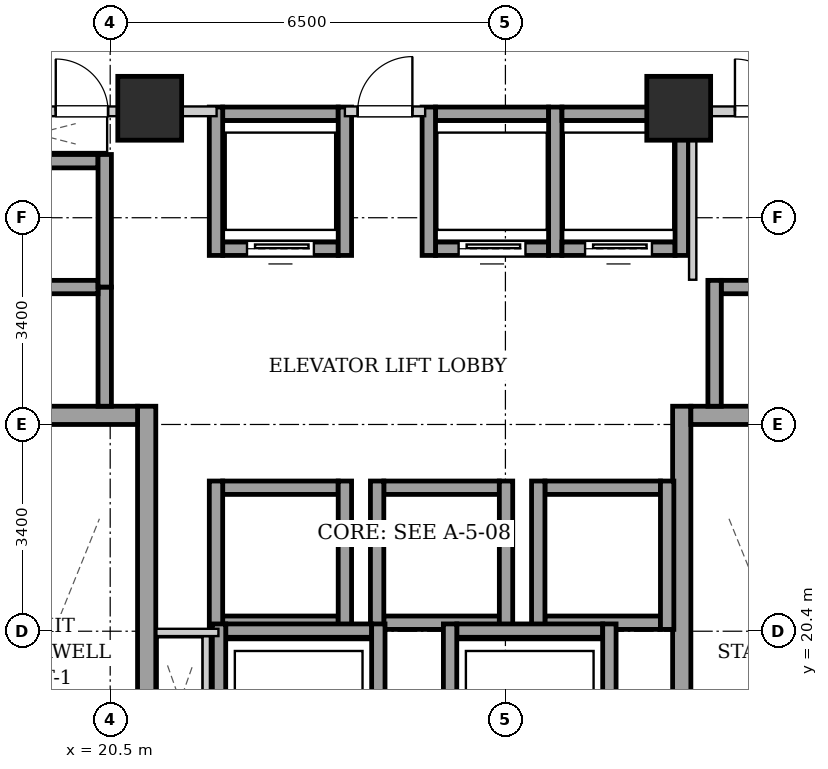
"""IFC4 building model, lengths in metres.
Left out: names, types, materials, properties, quantities, classifications, styles, units other than length and angle.
Written with IfcOpenShell. Run it as: python <this file> out.ifc"""

import sys

from ifc_helpers import new_model, si_unit, direction, frame, frame_2d, origin, origin_2d, place, context, subcontext, project, spatial, rectangle, extrude, element, fill, save


model = new_model("IFC4")
c1 = context("Model", 3, precision=1e-05, world=origin(), true_north=direction((0.0, 1.0)))
c2 = subcontext(c1, "Body", "Model", "MODEL_VIEW")
j1 = project(units=[si_unit("LENGTHUNIT", "METRE"), si_unit("PLANEANGLEUNIT", "RADIAN")], contexts=[c1])
p1 = place(None, origin())
s1 = spatial("IfcSite", under=j1, at=p1, CompositionType="ELEMENT")
p2 = place(p1, origin())
s2 = spatial("IfcBuilding", under=s1, at=p2, CompositionType="ELEMENT")
p3 = place(p2, frame((0.0, 0.0, 75.1)))
s3 = spatial("IfcBuildingStorey", under=s2, at=p3, CompositionType="ELEMENT", Elevation=75.1)
for number, where, z_axis, x_axis in (
    (1, (21.15, 29.0, 0.0), (0.0, 0.0, 1.0), (1.0, 0.0, 0.0)),
    (2, (29.85, 29.0, 0.0), (0.0, 0.0, 1.0), (1.0, 0.0, 0.0)),
):
    element("IfcColumn", number, at=place(p3, frame(where, z_axis=z_axis, x_axis=x_axis)), inside=s3, PredefinedType="COLUMN", context=c2, shape_type="SweptSolid", body=[
        extrude(rectangle(XDim=1.05, YDim=1.05, at=origin_2d()), origin(), (0.0, 0.0, 1.0), 3.2),
    ])
p4 = place(p3, frame((21.1, 15.1, 0.0), z_axis=(0.0, 0.0, 1.0), x_axis=(0.0, 1.0, 0.0)))
e3 = element("IfcWall", 3, at=p4, inside=s3, PredefinedType="SHEAR", context=c2, shape_type="SweptSolid", body=[
    extrude(rectangle(XDim=9.0, YDim=0.3, at=frame_2d((4.5, 0.0))), origin(), (0.0, 0.0, 1.0), 2.94),
])
p5 = place(p3, frame((18.1, 23.95, 0.0), z_axis=(0.0, 0.0, 1.0), x_axis=(1.0, 0.0, 0.0)))
e4 = element("IfcWall", 4, at=p5, inside=s3, PredefinedType="SHEAR", context=c2, shape_type="SweptSolid", body=[
    extrude(rectangle(XDim=2.85, YDim=0.3, at=frame_2d((1.425, 0.0))), origin(), (0.0, 0.0, 1.0), 2.94),
])
p6 = place(p3, frame((29.9, 15.1, 0.0), z_axis=(0.0, 0.0, 1.0), x_axis=(0.0, 1.0, 0.0)))
e5 = element("IfcWall", 5, at=p6, inside=s3, PredefinedType="SHEAR", context=c2, shape_type="SweptSolid", body=[
    extrude(rectangle(XDim=9.0, YDim=0.3, at=frame_2d((4.5, 0.0))), origin(), (0.0, 0.0, 1.0), 2.94),
])
p7 = place(p3, frame((30.05, 23.95, 0.0), z_axis=(0.0, 0.0, 1.0), x_axis=(1.0, 0.0, 0.0)))
e6 = element("IfcWall", 6, at=p7, inside=s3, PredefinedType="SHEAR", context=c2, shape_type="SweptSolid", body=[
    extrude(rectangle(XDim=2.85, YDim=0.3, at=frame_2d((1.425, 0.0))), origin(), (0.0, 0.0, 1.0), 2.94),
])
p8 = place(p3, frame((22.35, 26.69, 0.0), z_axis=(0.0, 0.0, 1.0), x_axis=(1.0, 0.0, 0.0)))
e7 = element("IfcWall", 7, at=p8, inside=s3, PredefinedType="SHEAR", context=c2, shape_type="SweptSolid", body=[
    extrude(rectangle(XDim=1.9, YDim=0.22, at=frame_2d((0.95, 0.0))), origin(), (0.0, 0.0, 1.0), 2.94),
])
p9 = place(p8, frame((0.4, 0.0, 0.0)))
e8 = element("IfcOpeningElement", 8, at=p9, cuts=e7, PredefinedType="OPENING", context=c2, shape_type="SweptSolid", body=[
    extrude(rectangle(XDim=1.1, YDim=2.15, at=frame_2d((0.55, 1.075))), frame((0.0, 0.12, 0.0), z_axis=(0.0, -1.0, 0.0), x_axis=(1.0, 0.0, 0.0)), (0.0, 0.0, 1.0), 0.24),
])
p10 = place(p3, frame((22.35, 28.91, 0.0), z_axis=(0.0, 0.0, 1.0), x_axis=(1.0, 0.0, 0.0)))
e9 = element("IfcWall", 9, at=p10, inside=s3, PredefinedType="SHEAR", context=c2, shape_type="SweptSolid", body=[
    extrude(rectangle(XDim=1.9, YDim=0.22, at=frame_2d((0.95, 0.0))), origin(), (0.0, 0.0, 1.0), 2.94),
])
for number, where, z_axis, x_axis in (
    (10, (22.24, 26.58, 0.0), (0.0, 0.0, 1.0), (0.0, 1.0, 0.0)),
    (11, (24.36, 26.58, 0.0), (0.0, 0.0, 1.0), (0.0, 1.0, 0.0)),
):
    element("IfcWall", number, at=place(p3, frame(where, z_axis=z_axis, x_axis=x_axis)), inside=s3, PredefinedType="SHEAR", context=c2, shape_type="SweptSolid", body=[
        extrude(rectangle(XDim=2.44, YDim=0.22, at=frame_2d((1.22, 0.0))), origin(), (0.0, 0.0, 1.0), 2.94),
    ])
p11 = place(p3, frame((25.85, 26.69, 0.0), z_axis=(0.0, 0.0, 1.0), x_axis=(1.0, 0.0, 0.0)))
e12 = element("IfcWall", 12, at=p11, inside=s3, PredefinedType="SHEAR", context=c2, shape_type="SweptSolid", body=[
    extrude(rectangle(XDim=1.86, YDim=0.22, at=frame_2d((0.93, 0.0))), origin(), (0.0, 0.0, 1.0), 2.94),
])
p12 = place(p11, frame((0.38, 0.0, 0.0)))
e13 = element("IfcOpeningElement", 13, at=p12, cuts=e12, PredefinedType="OPENING", context=c2, shape_type="SweptSolid", body=[
    extrude(rectangle(XDim=1.1, YDim=2.15, at=frame_2d((0.55, 1.075))), frame((0.0, 0.12, 0.0), z_axis=(0.0, -1.0, 0.0), x_axis=(1.0, 0.0, 0.0)), (0.0, 0.0, 1.0), 0.24),
])
p13 = place(p3, frame((25.85, 28.91, 0.0), z_axis=(0.0, 0.0, 1.0), x_axis=(1.0, 0.0, 0.0)))
e14 = element("IfcWall", 14, at=p13, inside=s3, PredefinedType="SHEAR", context=c2, shape_type="SweptSolid", body=[
    extrude(rectangle(XDim=1.86, YDim=0.22, at=frame_2d((0.93, 0.0))), origin(), (0.0, 0.0, 1.0), 2.94),
])
for number, where, z_axis, x_axis in (
    (15, (25.74, 26.58, 0.0), (0.0, 0.0, 1.0), (0.0, 1.0, 0.0)),
    (16, (27.82, 26.58, 0.0), (0.0, 0.0, 1.0), (0.0, 1.0, 0.0)),
):
    element("IfcWall", number, at=place(p3, frame(where, z_axis=z_axis, x_axis=x_axis)), inside=s3, PredefinedType="SHEAR", context=c2, shape_type="SweptSolid", body=[
        extrude(rectangle(XDim=2.44, YDim=0.22, at=frame_2d((1.22, 0.0))), origin(), (0.0, 0.0, 1.0), 2.94),
    ])
p14 = place(p3, frame((27.93, 26.69, 0.0), z_axis=(0.0, 0.0, 1.0), x_axis=(1.0, 0.0, 0.0)))
e17 = element("IfcWall", 17, at=p14, inside=s3, PredefinedType="SHEAR", context=c2, shape_type="SweptSolid", body=[
    extrude(rectangle(XDim=1.86, YDim=0.22, at=frame_2d((0.93, 0.0))), origin(), (0.0, 0.0, 1.0), 2.94),
])
p15 = place(p14, frame((0.38, 0.0, 0.0)))
e18 = element("IfcOpeningElement", 18, at=p15, cuts=e17, PredefinedType="OPENING", context=c2, shape_type="SweptSolid", body=[
    extrude(rectangle(XDim=1.1, YDim=2.15, at=frame_2d((0.55, 1.075))), frame((0.0, 0.12, 0.0), z_axis=(0.0, -1.0, 0.0), x_axis=(1.0, 0.0, 0.0)), (0.0, 0.0, 1.0), 0.24),
])
p16 = place(p3, frame((27.93, 28.91, 0.0), z_axis=(0.0, 0.0, 1.0), x_axis=(1.0, 0.0, 0.0)))
e19 = element("IfcWall", 19, at=p16, inside=s3, PredefinedType="SHEAR", context=c2, shape_type="SweptSolid", body=[
    extrude(rectangle(XDim=1.86, YDim=0.22, at=frame_2d((0.93, 0.0))), origin(), (0.0, 0.0, 1.0), 2.94),
])
p17 = place(p3, frame((29.9, 26.58, 0.0), z_axis=(0.0, 0.0, 1.0), x_axis=(0.0, 1.0, 0.0)))
e20 = element("IfcWall", 20, at=p17, inside=s3, PredefinedType="SHEAR", context=c2, shape_type="SweptSolid", body=[
    extrude(rectangle(XDim=2.44, YDim=0.22, at=frame_2d((1.22, 0.0))), origin(), (0.0, 0.0, 1.0), 2.94),
])
for number, where, z_axis, x_axis in (
    (21, (22.35, 20.54, 0.0), (0.0, 0.0, 1.0), (1.0, 0.0, 0.0)),
    (22, (22.35, 22.76, 0.0), (0.0, 0.0, 1.0), (1.0, 0.0, 0.0)),
):
    element("IfcWall", number, at=place(p3, frame(where, z_axis=z_axis, x_axis=x_axis)), inside=s3, PredefinedType="SHEAR", context=c2, shape_type="SweptSolid", body=[
        extrude(rectangle(XDim=1.9, YDim=0.22, at=frame_2d((0.95, 0.0))), origin(), (0.0, 0.0, 1.0), 2.94),
    ])
for number, where, z_axis, x_axis in (
    (23, (22.24, 20.43, 0.0), (0.0, 0.0, 1.0), (0.0, 1.0, 0.0)),
    (24, (24.36, 20.43, 0.0), (0.0, 0.0, 1.0), (0.0, 1.0, 0.0)),
):
    element("IfcWall", number, at=place(p3, frame(where, z_axis=z_axis, x_axis=x_axis)), inside=s3, PredefinedType="SHEAR", context=c2, shape_type="SweptSolid", body=[
        extrude(rectangle(XDim=2.44, YDim=0.22, at=frame_2d((1.22, 0.0))), origin(), (0.0, 0.0, 1.0), 2.94),
    ])
for number, where, z_axis, x_axis in (
    (25, (25.0, 20.54, 0.0), (0.0, 0.0, 1.0), (1.0, 0.0, 0.0)),
    (26, (25.0, 22.76, 0.0), (0.0, 0.0, 1.0), (1.0, 0.0, 0.0)),
):
    element("IfcWall", number, at=place(p3, frame(where, z_axis=z_axis, x_axis=x_axis)), inside=s3, PredefinedType="SHEAR", context=c2, shape_type="SweptSolid", body=[
        extrude(rectangle(XDim=1.9, YDim=0.22, at=frame_2d((0.95, 0.0))), origin(), (0.0, 0.0, 1.0), 2.94),
    ])
for number, where, z_axis, x_axis in (
    (27, (24.89, 20.43, 0.0), (0.0, 0.0, 1.0), (0.0, 1.0, 0.0)),
    (28, (27.01, 20.43, 0.0), (0.0, 0.0, 1.0), (0.0, 1.0, 0.0)),
):
    element("IfcWall", number, at=place(p3, frame(where, z_axis=z_axis, x_axis=x_axis)), inside=s3, PredefinedType="SHEAR", context=c2, shape_type="SweptSolid", body=[
        extrude(rectangle(XDim=2.44, YDim=0.22, at=frame_2d((1.22, 0.0))), origin(), (0.0, 0.0, 1.0), 2.94),
    ])
for number, where, z_axis, x_axis in (
    (29, (27.65, 20.54, 0.0), (0.0, 0.0, 1.0), (1.0, 0.0, 0.0)),
    (30, (27.65, 22.76, 0.0), (0.0, 0.0, 1.0), (1.0, 0.0, 0.0)),
):
    element("IfcWall", number, at=place(p3, frame(where, z_axis=z_axis, x_axis=x_axis)), inside=s3, PredefinedType="SHEAR", context=c2, shape_type="SweptSolid", body=[
        extrude(rectangle(XDim=1.9, YDim=0.22, at=frame_2d((0.95, 0.0))), origin(), (0.0, 0.0, 1.0), 2.94),
    ])
for number, where, z_axis, x_axis in (
    (31, (27.54, 20.43, 0.0), (0.0, 0.0, 1.0), (0.0, 1.0, 0.0)),
    (32, (29.66, 20.43, 0.0), (0.0, 0.0, 1.0), (0.0, 1.0, 0.0)),
):
    element("IfcWall", number, at=place(p3, frame(where, z_axis=z_axis, x_axis=x_axis)), inside=s3, PredefinedType="SHEAR", context=c2, shape_type="SweptSolid", body=[
        extrude(rectangle(XDim=2.44, YDim=0.22, at=frame_2d((1.22, 0.0))), origin(), (0.0, 0.0, 1.0), 2.94),
    ])
p18 = place(p3, frame((20.41, 24.1, 0.0), z_axis=(0.0, 0.0, 1.0), x_axis=(0.0, 1.0, 0.0)))
e33 = element("IfcWall", 33, at=p18, inside=s3, PredefinedType="SHEAR", context=c2, shape_type="SweptSolid", body=[
    extrude(rectangle(XDim=1.96, YDim=0.22, at=frame_2d((0.98, 0.0))), origin(), (0.0, 0.0, 1.0), 2.94),
])
for number, where, z_axis, x_axis in (
    (34, (18.4, 26.06, 0.0), (0.0, 0.0, 1.0), (1.0, 0.0, 0.0)),
    (35, (18.4, 28.13, 0.0), (0.0, 0.0, 1.0), (1.0, 0.0, 0.0)),
):
    element("IfcWall", number, at=place(p3, frame(where, z_axis=z_axis, x_axis=x_axis)), inside=s3, PredefinedType="SHEAR", context=c2, shape_type="SweptSolid", body=[
        extrude(rectangle(XDim=1.9, YDim=0.22, at=frame_2d((0.95, 0.0))), origin(), (0.0, 0.0, 1.0), 2.94),
    ])
p19 = place(p3, frame((20.41, 26.06, 0.0), z_axis=(0.0, 0.0, 1.0), x_axis=(0.0, 1.0, 0.0)))
e36 = element("IfcWall", 36, at=p19, inside=s3, PredefinedType="SHEAR", context=c2, shape_type="SweptSolid", body=[
    extrude(rectangle(XDim=2.18, YDim=0.22, at=frame_2d((1.09, 0.0))), origin(), (0.0, 0.0, 1.0), 2.94),
])
p20 = place(p3, frame((30.55, 26.06, 0.0), z_axis=(0.0, 0.0, 1.0), x_axis=(1.0, 0.0, 0.0)))
e37 = element("IfcWall", 37, at=p20, inside=s3, PredefinedType="SHEAR", context=c2, shape_type="SweptSolid", body=[
    extrude(rectangle(XDim=1.9, YDim=0.22, at=frame_2d((0.95, 0.0))), origin(), (0.0, 0.0, 1.0), 2.94),
])
p21 = place(p3, frame((30.44, 24.1, 0.0), z_axis=(0.0, 0.0, 1.0), x_axis=(0.0, 1.0, 0.0)))
e38 = element("IfcWall", 38, at=p21, inside=s3, PredefinedType="SHEAR", context=c2, shape_type="SweptSolid", body=[
    extrude(rectangle(XDim=2.07, YDim=0.22, at=frame_2d((1.035, 0.0))), origin(), (0.0, 0.0, 1.0), 2.94),
])
p22 = place(p3, frame((22.4, 20.41, 0.0), z_axis=(0.0, 0.0, 1.0), x_axis=(1.0, 0.0, 0.0)))
e39 = element("IfcWall", 39, at=p22, inside=s3, PredefinedType="SHEAR", context=c2, shape_type="SweptSolid", body=[
    extrude(rectangle(XDim=2.4, YDim=0.22, at=frame_2d((1.2, 0.0))), origin(), (0.0, 0.0, 1.0), 2.94),
])
for number, where, z_axis, x_axis in (
    (40, (22.29, 17.98, 0.0), (0.0, 0.0, 1.0), (0.0, 1.0, 0.0)),
    (41, (24.91, 17.98, 0.0), (0.0, 0.0, 1.0), (0.0, 1.0, 0.0)),
):
    element("IfcWall", number, at=place(p3, frame(where, z_axis=z_axis, x_axis=x_axis)), inside=s3, PredefinedType="SHEAR", context=c2, shape_type="SweptSolid", body=[
        extrude(rectangle(XDim=2.54, YDim=0.22, at=frame_2d((1.27, 0.0))), origin(), (0.0, 0.0, 1.0), 2.94),
    ])
p23 = place(p3, frame((26.2, 20.41, 0.0), z_axis=(0.0, 0.0, 1.0), x_axis=(1.0, 0.0, 0.0)))
e42 = element("IfcWall", 42, at=p23, inside=s3, PredefinedType="SHEAR", context=c2, shape_type="SweptSolid", body=[
    extrude(rectangle(XDim=2.4, YDim=0.22, at=frame_2d((1.2, 0.0))), origin(), (0.0, 0.0, 1.0), 2.94),
])
for number, where, z_axis, x_axis in (
    (43, (26.09, 17.98, 0.0), (0.0, 0.0, 1.0), (0.0, 1.0, 0.0)),
    (44, (28.71, 17.98, 0.0), (0.0, 0.0, 1.0), (0.0, 1.0, 0.0)),
):
    element("IfcWall", number, at=place(p3, frame(where, z_axis=z_axis, x_axis=x_axis)), inside=s3, PredefinedType="SHEAR", context=c2, shape_type="SweptSolid", body=[
        extrude(rectangle(XDim=2.54, YDim=0.22, at=frame_2d((1.27, 0.0))), origin(), (0.0, 0.0, 1.0), 2.94),
    ])
p24 = place(p3, frame((24.36, 28.95, 0.0), z_axis=(0.0, 0.0, 1.0), x_axis=(1.0, 0.0, 0.0)))
e45 = element("IfcWall", 45, at=p24, inside=s3, PredefinedType="PARTITIONING", context=c2, shape_type="SweptSolid", body=[
    extrude(rectangle(XDim=1.32, YDim=0.16, at=frame_2d((0.66, 0.0))), origin(), (0.0, 0.0, 1.0), 2.309),
])
p25 = place(p24, frame((0.21, 0.0, 0.0)))
e46 = element("IfcOpeningElement", 46, at=p25, cuts=e45, PredefinedType="OPENING", context=c2, shape_type="SweptSolid", body=[
    extrude(rectangle(XDim=0.9, YDim=2.05, at=frame_2d((0.45, 1.025))), frame((0.0, 0.09, 0.0), z_axis=(0.0, -1.0, 0.0), x_axis=(1.0, 0.0, 0.0)), (0.0, 0.0, 1.0), 0.18),
])
p26 = place(p3, frame((17.96, 28.95, 0.0), z_axis=(0.0, 0.0, 1.0), x_axis=(1.0, 0.0, 0.0)))
e47 = element("IfcWall", 47, at=p26, inside=s3, PredefinedType="PARTITIONING", context=c2, shape_type="SweptSolid", body=[
    extrude(rectangle(XDim=4.29, YDim=0.16, at=frame_2d((2.145, 0.0))), origin(), (0.0, 0.0, 1.0), 2.309),
])
p27 = place(p26, frame((1.645, 0.0, 0.0)))
e48 = element("IfcOpeningElement", 48, at=p27, cuts=e47, PredefinedType="OPENING", context=c2, shape_type="SweptSolid", body=[
    extrude(rectangle(XDim=0.86, YDim=2.05, at=frame_2d((0.43, 1.025))), frame((0.0, 0.09, 0.0), z_axis=(0.0, -1.0, 0.0), x_axis=(1.0, 0.0, 0.0)), (0.0, 0.0, 1.0), 0.18),
])
p28 = place(p3, frame((22.08, 18.2, 0.0), z_axis=(0.0, 0.0, 1.0), x_axis=(0.0, 1.0, 0.0)))
e49 = element("IfcWall", 49, at=p28, inside=s3, PredefinedType="PARTITIONING", context=c2, shape_type="SweptSolid", body=[
    extrude(rectangle(XDim=2.12, YDim=0.12, at=frame_2d((1.06, 0.0))), origin(), (0.0, 0.0, 1.0), 2.94),
])
p29 = place(p3, frame((22.28, 20.38, 0.0), z_axis=(0.0, 0.0, 1.0), x_axis=(-1.0, 0.0, 0.0)))
e50 = element("IfcWall", 50, at=p29, inside=s3, PredefinedType="PARTITIONING", context=c2, shape_type="SweptSolid", body=[
    extrude(rectangle(XDim=1.02, YDim=0.12, at=frame_2d((0.51, 0.0))), origin(), (0.0, 0.0, 1.0), 2.94),
])
p30 = place(p3, frame((30.08, 26.18, 0.0), z_axis=(0.0, 0.0, 1.0), x_axis=(0.0, 1.0, 0.0)))
e51 = element("IfcWall", 51, at=p30, inside=s3, PredefinedType="PARTITIONING", context=c2, shape_type="SweptSolid", body=[
    extrude(rectangle(XDim=2.68, YDim=0.12, at=frame_2d((1.34, 0.0))), origin(), (0.0, 0.0, 1.0), 2.94),
])
p31 = place(p3, frame((30.08, 28.95, 0.0), z_axis=(0.0, 0.0, 1.0), x_axis=(1.0, 0.0, 0.0)))
e52 = element("IfcWall", 52, at=p31, inside=s3, PredefinedType="PARTITIONING", context=c2, shape_type="SweptSolid", body=[
    extrude(rectangle(XDim=2.96, YDim=0.16, at=frame_2d((1.48, 0.0))), origin(), (0.0, 0.0, 1.0), 2.94),
])
p32 = place(p31, frame((0.695, 0.0, 0.0)))
e53 = element("IfcOpeningElement", 53, at=p32, cuts=e52, PredefinedType="OPENING", context=c2, shape_type="SweptSolid", body=[
    extrude(rectangle(XDim=0.86, YDim=2.05, at=frame_2d((0.43, 1.025))), frame((0.0, 0.09, 0.0), z_axis=(0.0, -1.0, 0.0), x_axis=(1.0, 0.0, 0.0)), (0.0, 0.0, 1.0), 0.18),
])
p33 = place(p9, origin())
e54 = element("IfcDoor", 54, at=p33, inside=s3, OperationType="SLIDING_TO_LEFT", PredefinedType="DOOR", context=c2, shape_type="SweptSolid", body=[
    extrude(rectangle(XDim=1.1, YDim=2.15, at=frame_2d((0.55, 1.075))), frame((0.0, 0.025, 0.0), z_axis=(0.0, -1.0, 0.0), x_axis=(1.0, 0.0, 0.0)), (0.0, 0.0, 1.0), 0.05),
])
fill(e8, e54)
p34 = place(p12, origin())
e55 = element("IfcDoor", 55, at=p34, inside=s3, OperationType="SLIDING_TO_LEFT", PredefinedType="DOOR", context=c2, shape_type="SweptSolid", body=[
    extrude(rectangle(XDim=1.1, YDim=2.15, at=frame_2d((0.55, 1.075))), frame((0.0, 0.025, 0.0), z_axis=(0.0, -1.0, 0.0), x_axis=(1.0, 0.0, 0.0)), (0.0, 0.0, 1.0), 0.05),
])
fill(e13, e55)
p35 = place(p15, origin())
e56 = element("IfcDoor", 56, at=p35, inside=s3, OperationType="SLIDING_TO_LEFT", PredefinedType="DOOR", context=c2, shape_type="SweptSolid", body=[
    extrude(rectangle(XDim=1.1, YDim=2.15, at=frame_2d((0.55, 1.075))), frame((0.0, 0.025, 0.0), z_axis=(0.0, -1.0, 0.0), x_axis=(1.0, 0.0, 0.0)), (0.0, 0.0, 1.0), 0.05),
])
fill(e18, e56)
p36 = place(p25, origin())
e57 = element("IfcDoor", 57, at=p36, inside=s3, OperationType="SINGLE_SWING_RIGHT", PredefinedType="DOOR", context=c2, shape_type="SweptSolid", body=[
    extrude(rectangle(XDim=0.9, YDim=2.05, at=frame_2d((0.45, 1.025))), frame((0.0, 0.025, 0.0), z_axis=(0.0, -1.0, 0.0), x_axis=(1.0, 0.0, 0.0)), (0.0, 0.0, 1.0), 0.05),
])
fill(e46, e57)
p37 = place(p27, origin())
e58 = element("IfcDoor", 58, at=p37, inside=s3, OperationType="SINGLE_SWING_LEFT", PredefinedType="DOOR", context=c2, shape_type="SweptSolid", body=[
    extrude(rectangle(XDim=0.86, YDim=2.05, at=frame_2d((0.43, 1.025))), frame((0.0, 0.025, 0.0), z_axis=(0.0, -1.0, 0.0), x_axis=(1.0, 0.0, 0.0)), (0.0, 0.0, 1.0), 0.05),
])
fill(e48, e58)
p38 = place(p32, origin())
e59 = element("IfcDoor", 59, at=p38, inside=s3, OperationType="SINGLE_SWING_LEFT", PredefinedType="DOOR", context=c2, shape_type="SweptSolid", body=[
    extrude(rectangle(XDim=0.86, YDim=2.05, at=frame_2d((0.43, 1.025))), frame((0.0, 0.025, 0.0), z_axis=(0.0, -1.0, 0.0), x_axis=(1.0, 0.0, 0.0)), (0.0, 0.0, 1.0), 0.05),
])
fill(e53, e59)
save(model, sys.argv[1])
